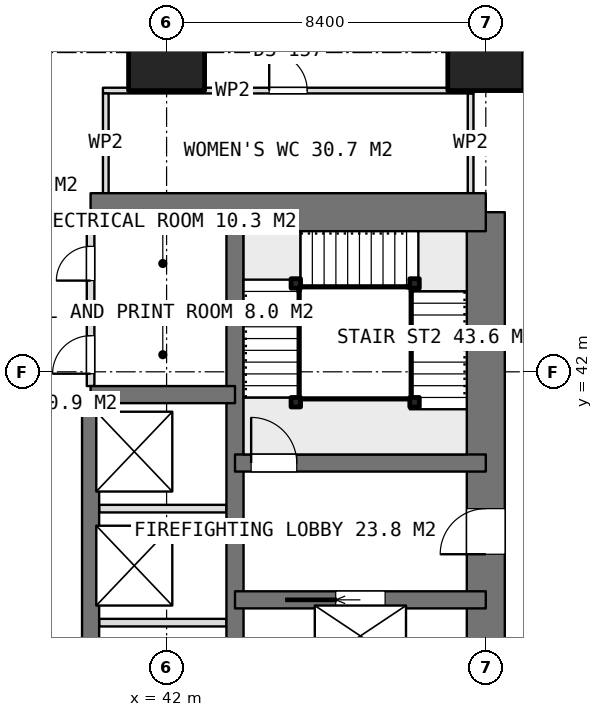
"""IFC4 building model, lengths in metres.
Left out: names, types, materials, properties, quantities, classifications, styles, units other than length and angle.
Written with IfcOpenShell. Run it as: python <this file> out.ifc"""

import sys

from ifc_helpers import new_model, si_unit, direction, frame, frame_2d, origin, origin_2d, place, context, subcontext, project, spatial, rectangle, extrude, element, fill, save


model = new_model("IFC4")
c1 = context("Model", 3, precision=1e-05, world=origin(), true_north=direction((0.0, 1.0)))
c2 = subcontext(c1, "Body", "Model", "MODEL_VIEW")
j1 = project(units=[si_unit("LENGTHUNIT", "METRE"), si_unit("PLANEANGLEUNIT", "RADIAN")], contexts=[c1])
p1 = place(None, origin())
s1 = spatial("IfcSite", under=j1, at=p1, CompositionType="ELEMENT")
p2 = place(p1, origin())
s2 = spatial("IfcBuilding", under=s1, at=p2, CompositionType="ELEMENT")
p3 = place(p2, frame((0.0, 0.0, 144.05)))
s3 = spatial("IfcBuildingStorey", under=s2, at=p3, CompositionType="ELEMENT", Elevation=144.05)
p4 = place(p3, frame((40.0, 46.2, 0.0), z_axis=(0.0, 0.0, 1.0), x_axis=(1.0, 0.0, 0.0)))
e1 = element("IfcWall", 1, at=p4, inside=s3, PredefinedType="SHEAR", context=c2, shape_type="SweptSolid", body=[
    extrude(rectangle(XDim=10.4, YDim=1.0, at=frame_2d((5.2, 0.0))), origin(), (0.0, 0.0, 1.0), 3.75),
])
p5 = place(p3, frame((50.4, 21.0, 0.0), z_axis=(0.0, 0.0, 1.0), x_axis=(0.0, 1.0, 0.0)))
e2 = element("IfcWall", 2, at=p5, inside=s3, PredefinedType="SHEAR", context=c2, shape_type="SweptSolid", body=[
    extrude(rectangle(XDim=25.2, YDim=1.0, at=frame_2d((12.6, 0.0))), origin(), (0.0, 0.0, 1.0), 3.75),
])
p6 = place(p5, frame((16.2, 0.0, 0.0)))
e3 = element("IfcOpeningElement", 3, at=p6, cuts=e2, PredefinedType="OPENING", context=c2, shape_type="SweptSolid", body=[
    extrude(rectangle(XDim=1.2, YDim=2.1, at=frame_2d((0.6, 1.05))), frame((0.0, 0.51, 0.0), z_axis=(0.0, -1.0, 0.0), x_axis=(1.0, 0.0, 0.0)), (0.0, 0.0, 1.0), 1.02),
])
p7 = place(p5, frame((10.05, 0.0, 0.0)))
e4 = element("IfcOpeningElement", 4, at=p7, cuts=e2, PredefinedType="OPENING", context=c2, shape_type="SweptSolid", body=[
    extrude(rectangle(XDim=0.9, YDim=2.1, at=frame_2d((0.45, 1.05))), frame((0.0, 0.51, 0.0), z_axis=(0.0, -1.0, 0.0), x_axis=(1.0, 0.0, 0.0)), (0.0, 0.0, 1.0), 1.02),
])
p8 = place(p5, frame((7.45, 0.0, 0.0)))
e5 = element("IfcOpeningElement", 5, at=p8, cuts=e2, PredefinedType="OPENING", context=c2, shape_type="SweptSolid", body=[
    extrude(rectangle(XDim=0.9, YDim=2.1, at=frame_2d((0.45, 1.05))), frame((0.0, 0.51, 0.0), z_axis=(0.0, -1.0, 0.0), x_axis=(1.0, 0.0, 0.0)), (0.0, 0.0, 1.0), 1.02),
])
p9 = place(p5, frame((0.7, 0.0, 0.0)))
e6 = element("IfcOpeningElement", 6, at=p9, cuts=e2, PredefinedType="OPENING", context=c2, shape_type="SweptSolid", body=[
    extrude(rectangle(XDim=1.2, YDim=2.1, at=frame_2d((0.6, 1.05))), frame((0.0, 0.51, 0.0), z_axis=(0.0, -1.0, 0.0), x_axis=(1.0, 0.0, 0.0)), (0.0, 0.0, 1.0), 1.02),
])
p10 = place(p3, frame((43.8, 21.0, 0.0), z_axis=(0.0, 0.0, 1.0), x_axis=(0.0, 1.0, 0.0)))
e7 = element("IfcWall", 7, at=p10, inside=s3, PredefinedType="SHEAR", context=c2, shape_type="SweptSolid", body=[
    extrude(rectangle(XDim=25.2, YDim=0.45, at=frame_2d((12.6, 0.0))), origin(), (0.0, 0.0, 1.0), 3.75),
])
p11 = place(p3, frame((40.0, 23.4, 0.0), z_axis=(0.0, 0.0, 1.0), x_axis=(0.0, 1.0, 0.0)))
e8 = element("IfcWall", 8, at=p11, inside=s3, PredefinedType="SHEAR", context=c2, shape_type="SweptSolid", body=[
    extrude(rectangle(XDim=18.0, YDim=0.45, at=frame_2d((9.0, 0.0))), origin(), (0.0, 0.0, 1.0), 3.75),
])
p12 = place(p11, frame((1.7, 0.0, 0.0)))
e9 = element("IfcOpeningElement", 9, at=p12, cuts=e8, PredefinedType="OPENING", context=c2, shape_type="SweptSolid", body=[
    extrude(rectangle(XDim=1.0, YDim=2.1, at=frame_2d((0.5, 1.05))), frame((0.0, 0.235, 0.0), z_axis=(0.0, -1.0, 0.0), x_axis=(1.0, 0.0, 0.0)), (0.0, 0.0, 1.0), 0.47),
])
p13 = place(p11, frame((4.75, 0.0, 0.0)))
e10 = element("IfcOpeningElement", 10, at=p13, cuts=e8, PredefinedType="OPENING", context=c2, shape_type="SweptSolid", body=[
    extrude(rectangle(XDim=0.9, YDim=2.1, at=frame_2d((0.45, 1.05))), frame((0.0, 0.235, 0.0), z_axis=(0.0, -1.0, 0.0), x_axis=(1.0, 0.0, 0.0)), (0.0, 0.0, 1.0), 0.47),
])
p14 = place(p3, frame((40.0, 41.4, 0.0), z_axis=(0.0, 0.0, 1.0), x_axis=(1.0, 0.0, 0.0)))
e11 = element("IfcWall", 11, at=p14, inside=s3, PredefinedType="SHEAR", context=c2, shape_type="SweptSolid", body=[
    extrude(rectangle(XDim=3.8, YDim=0.45, at=frame_2d((1.9, 0.0))), origin(), (0.0, 0.0, 1.0), 3.75),
])
p15 = place(p3, frame((43.8, 36.0, 0.0), z_axis=(0.0, 0.0, 1.0), x_axis=(1.0, 0.0, 0.0)))
e12 = element("IfcWall", 12, at=p15, inside=s3, PredefinedType="SHEAR", context=c2, shape_type="SweptSolid", body=[
    extrude(rectangle(XDim=6.6, YDim=0.45, at=frame_2d((3.3, 0.0))), origin(), (0.0, 0.0, 1.0), 3.75),
])
p16 = place(p15, frame((2.65, 0.0, 0.0)))
e13 = element("IfcOpeningElement", 13, at=p16, cuts=e12, PredefinedType="OPENING", context=c2, shape_type="SweptSolid", body=[
    extrude(rectangle(XDim=1.3, YDim=2.1, at=frame_2d((0.65, 1.05))), frame((0.0, 0.235, 0.0), z_axis=(0.0, -1.0, 0.0), x_axis=(1.0, 0.0, 0.0)), (0.0, 0.0, 1.0), 0.47),
])
p17 = place(p3, frame((43.8, 39.6, 0.0), z_axis=(0.0, 0.0, 1.0), x_axis=(1.0, 0.0, 0.0)))
e14 = element("IfcWall", 14, at=p17, inside=s3, PredefinedType="SHEAR", context=c2, shape_type="SweptSolid", body=[
    extrude(rectangle(XDim=6.6, YDim=0.45, at=frame_2d((3.3, 0.0))), origin(), (0.0, 0.0, 1.0), 3.75),
])
p18 = place(p17, frame((0.425, 0.0, 0.0)))
e15 = element("IfcOpeningElement", 15, at=p18, cuts=e14, PredefinedType="OPENING", context=c2, shape_type="SweptSolid", body=[
    extrude(rectangle(XDim=1.2, YDim=2.1, at=frame_2d((0.6, 1.05))), frame((0.0, 0.235, 0.0), z_axis=(0.0, -1.0, 0.0), x_axis=(1.0, 0.0, 0.0)), (0.0, 0.0, 1.0), 0.47),
])
for number, where, z_axis, x_axis in (
    (16, (42.0, 50.4, 0.0), (0.0, 0.0, 1.0), (1.0, 0.0, 0.0)),
    (17, (50.4, 50.4, 0.0), (0.0, 0.0, 1.0), (1.0, 0.0, 0.0)),
):
    element("IfcColumn", number, at=place(p3, frame(where, z_axis=z_axis, x_axis=x_axis)), inside=s3, PredefinedType="COLUMN", context=c2, shape_type="SweptSolid", body=[
        extrude(rectangle(XDim=2.0, YDim=2.0, at=origin_2d()), origin(), (0.0, 0.0, 1.0), 3.75),
    ])
for number, where, z_axis, x_axis in (
    (18, (40.225, 35.4, 0.0), (0.0, 0.0, 1.0), (1.0, 0.0, 0.0)),
    (19, (40.225, 38.4, 0.0), (0.0, 0.0, 1.0), (1.0, 0.0, 0.0)),
):
    element("IfcWall", number, at=place(p3, frame(where, z_axis=z_axis, x_axis=x_axis)), inside=s3, PredefinedType="PARTITIONING", context=c2, shape_type="SweptSolid", body=[
        extrude(rectangle(XDim=3.35, YDim=0.2, at=frame_2d((1.675, 0.0))), origin(), (0.0, 0.0, 1.0), 3.5),
    ])
p19 = place(p3, frame((40.0, 41.625, 0.0), z_axis=(0.0, 0.0, 1.0), x_axis=(0.0, 1.0, 0.0)))
e20 = element("IfcWall", 20, at=p19, inside=s3, PredefinedType="PARTITIONING", context=c2, shape_type="SweptSolid", body=[
    extrude(rectangle(XDim=4.075, YDim=0.2, at=frame_2d((2.038, 0.0))), origin(), (0.0, 0.0, 1.0), 3.5),
])
p20 = place(p19, frame((2.775, 0.0, 0.0)))
e21 = element("IfcOpeningElement", 21, at=p20, cuts=e20, PredefinedType="OPENING", context=c2, shape_type="SweptSolid", body=[
    extrude(rectangle(XDim=0.9, YDim=2.1, at=frame_2d((0.45, 1.05))), frame((0.0, 0.11, 0.0), z_axis=(0.0, -1.0, 0.0), x_axis=(1.0, 0.0, 0.0)), (0.0, 0.0, 1.0), 0.22),
])
p21 = place(p19, frame((0.325, 0.0, 0.0)))
e22 = element("IfcOpeningElement", 22, at=p21, cuts=e20, PredefinedType="OPENING", context=c2, shape_type="SweptSolid", body=[
    extrude(rectangle(XDim=1.0, YDim=2.1, at=frame_2d((0.5, 1.05))), frame((0.0, 0.11, 0.0), z_axis=(0.0, -1.0, 0.0), x_axis=(1.0, 0.0, 0.0)), (0.0, 0.0, 1.0), 0.22),
])
p22 = place(p3, frame((40.0, 43.5, 0.0), z_axis=(0.0, 0.0, 1.0), x_axis=(1.0, 0.0, 0.0)))
e23 = element("IfcWall", 23, at=p22, inside=s3, PredefinedType="PARTITIONING", context=c2, shape_type="SweptSolid", body=[
    extrude(rectangle(XDim=3.575, YDim=0.2, at=frame_2d((1.788, 0.0))), origin(), (0.0, 0.0, 1.0), 3.5),
])
p23 = place(p3, frame((40.325, 49.4, 0.0), z_axis=(0.0, 0.0, 1.0), x_axis=(1.0, 0.0, 0.0)))
e24 = element("IfcWall", 24, at=p23, inside=s3, PredefinedType="PARTITIONING", context=c2, shape_type="SweptSolid", body=[
    extrude(rectangle(XDim=9.75, YDim=0.15, at=frame_2d((4.875, 0.0))), origin(), (0.0, 0.0, 1.0), 3.5),
])
p24 = place(p23, frame((4.375, 0.0, 0.0)))
e25 = element("IfcOpeningElement", 25, at=p24, cuts=e24, PredefinedType="OPENING", context=c2, shape_type="SweptSolid", body=[
    extrude(rectangle(XDim=1.0, YDim=2.1, at=frame_2d((0.5, 1.05))), frame((0.0, 0.085, 0.0), z_axis=(0.0, -1.0, 0.0), x_axis=(1.0, 0.0, 0.0)), (0.0, 0.0, 1.0), 0.17),
])
for number, where, z_axis, x_axis in (
    (26, (40.4, 46.7, 0.0), (0.0, 0.0, 1.0), (0.0, 1.0, 0.0)),
    (27, (50.0, 46.7, 0.0), (0.0, 0.0, 1.0), (0.0, 1.0, 0.0)),
):
    element("IfcWall", number, at=place(p3, frame(where, z_axis=z_axis, x_axis=x_axis)), inside=s3, PredefinedType="PARTITIONING", context=c2, shape_type="SweptSolid", body=[
        extrude(rectangle(XDim=2.625, YDim=0.15, at=frame_2d((1.312, 0.0))), origin(), (0.0, 0.0, 1.0), 3.5),
    ])
for number, where, z_axis, x_axis in (
    (28, (45.4, 41.2, 0.0), (0.0, 0.0, 1.0), (1.0, 0.0, 0.0)),
    (29, (45.4, 44.325, 0.0), (0.0, 0.0, 1.0), (1.0, 0.0, 0.0)),
    (30, (48.525, 44.325, 0.0), (0.0, 0.0, 1.0), (1.0, 0.0, 0.0)),
    (31, (48.525, 41.2, 0.0), (0.0, 0.0, 1.0), (1.0, 0.0, 0.0)),
):
    element("IfcColumn", number, at=place(p3, frame(where, z_axis=z_axis, x_axis=x_axis)), inside=s3, PredefinedType="COLUMN", context=c2, shape_type="SweptSolid", body=[
        extrude(rectangle(XDim=0.25, YDim=0.25, at=origin_2d()), origin(), (0.0, 0.0, 1.0), 3.75),
    ])
p25 = place(p6, origin())
e32 = element("IfcDoor", 32, at=p25, inside=s3, OperationType="SINGLE_SWING_LEFT", PredefinedType="DOOR", context=c2, shape_type="SweptSolid", body=[
    extrude(rectangle(XDim=1.2, YDim=2.1, at=frame_2d((0.6, 1.05))), frame((0.0, 0.025, 0.0), z_axis=(0.0, -1.0, 0.0), x_axis=(1.0, 0.0, 0.0)), (0.0, 0.0, 1.0), 0.05),
])
fill(e3, e32)
p26 = place(p20, origin())
e33 = element("IfcDoor", 33, at=p26, inside=s3, OperationType="SINGLE_SWING_LEFT", PredefinedType="DOOR", context=c2, shape_type="SweptSolid", body=[
    extrude(rectangle(XDim=0.9, YDim=2.1, at=frame_2d((0.45, 1.05))), frame((0.0, 0.025, 0.0), z_axis=(0.0, -1.0, 0.0), x_axis=(1.0, 0.0, 0.0)), (0.0, 0.0, 1.0), 0.05),
])
fill(e21, e33)
p27 = place(p21, origin())
e34 = element("IfcDoor", 34, at=p27, inside=s3, OperationType="SINGLE_SWING_LEFT", PredefinedType="DOOR", context=c2, shape_type="SweptSolid", body=[
    extrude(rectangle(XDim=1.0, YDim=2.1, at=frame_2d((0.5, 1.05))), frame((0.0, 0.025, 0.0), z_axis=(0.0, -1.0, 0.0), x_axis=(1.0, 0.0, 0.0)), (0.0, 0.0, 1.0), 0.05),
])
fill(e22, e34)
p28 = place(p16, origin())
e35 = element("IfcDoor", 35, at=p28, inside=s3, OperationType="SLIDING_TO_LEFT", PredefinedType="USERDEFINED", context=c2, shape_type="SweptSolid", body=[
    extrude(rectangle(XDim=1.3, YDim=2.1, at=frame_2d((0.65, 1.05))), frame((0.0, 0.025, 0.0), z_axis=(0.0, -1.0, 0.0), x_axis=(1.0, 0.0, 0.0)), (0.0, 0.0, 1.0), 0.05),
])
fill(e13, e35)
p29 = place(p24, origin())
e36 = element("IfcDoor", 36, at=p29, inside=s3, OperationType="SINGLE_SWING_LEFT", PredefinedType="DOOR", context=c2, shape_type="SweptSolid", body=[
    extrude(rectangle(XDim=1.0, YDim=2.1, at=frame_2d((0.5, 1.05))), frame((0.0, 0.025, 0.0), z_axis=(0.0, -1.0, 0.0), x_axis=(1.0, 0.0, 0.0)), (0.0, 0.0, 1.0), 0.05),
])
fill(e25, e36)
p30 = place(p18, origin())
e37 = element("IfcDoor", 37, at=p30, inside=s3, OperationType="SINGLE_SWING_RIGHT", PredefinedType="DOOR", context=c2, shape_type="SweptSolid", body=[
    extrude(rectangle(XDim=1.2, YDim=2.1, at=frame_2d((0.6, 1.05))), frame((0.0, 0.025, 0.0), z_axis=(0.0, -1.0, 0.0), x_axis=(1.0, 0.0, 0.0)), (0.0, 0.0, 1.0), 0.05),
])
fill(e15, e37)
save(model, sys.argv[1])
